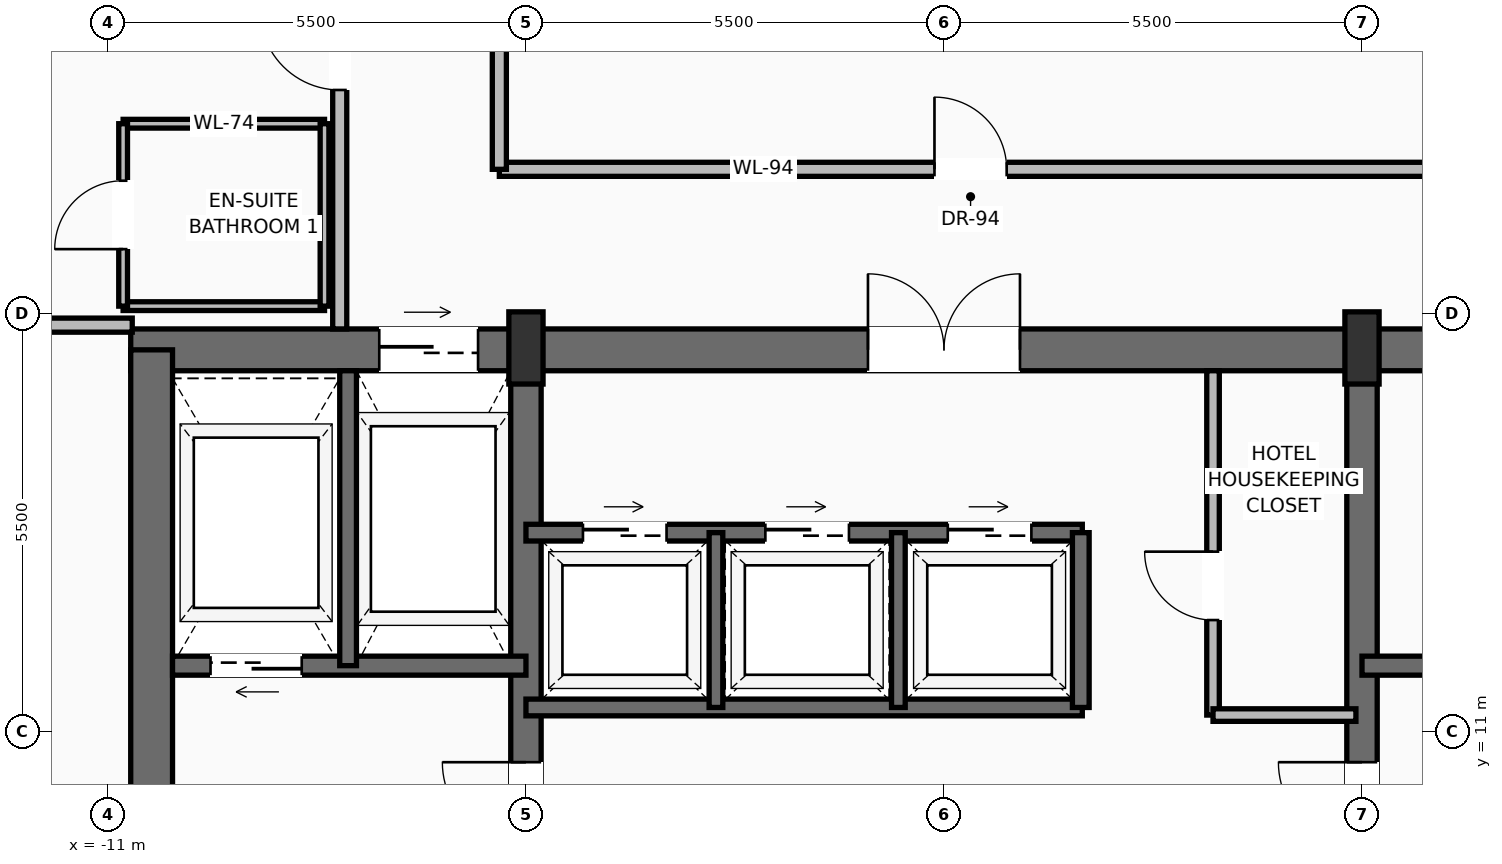
"""IFC4 building model, lengths in metres.
Left out: names, types, materials, properties, quantities, classifications, styles, units other than length and angle.
Written with IfcOpenShell. Run it as: python <this file> out.ifc"""

import sys

from ifc_helpers import new_model, si_unit, direction, frame, frame_2d, origin, origin_2d, place, context, subcontext, project, spatial, rectangle, extrude, source, transform, mapped, element, fill, save


model = new_model("IFC4")
c1 = context("Model", 3, precision=1e-05, world=origin(), true_north=direction((0.0, 1.0)))
c2 = subcontext(c1, "Body", "Model", "MODEL_VIEW")
j1 = project(units=[si_unit("LENGTHUNIT", "METRE"), si_unit("PLANEANGLEUNIT", "RADIAN")], contexts=[c1])
p1 = place(None, origin())
s1 = spatial("IfcSite", under=j1, at=p1, CompositionType="ELEMENT")
p2 = place(p1, origin())
s2 = spatial("IfcBuilding", under=s1, at=p2, CompositionType="ELEMENT")
p3 = place(p2, frame((0.0, 0.0, 240.7)))
s3 = spatial("IfcBuildingStorey", under=s2, at=p3, CompositionType="ELEMENT", Elevation=240.7)
p4 = place(p3, frame((-10.7, 16.025, 0.0), z_axis=(0.0, 0.0, 1.0), x_axis=(1.0, 0.0, 0.0)))
e1 = element("IfcWall", 1, at=p4, inside=s3, PredefinedType="SHEAR", context=c2, shape_type="SweptSolid", body=[
    extrude(rectangle(XDim=21.4, YDim=0.55, at=frame_2d((10.7, 0.0))), origin(), (0.0, 0.0, 1.0), 3.24),
])
p5 = place(p4, frame((3.27, 0.0, 0.0)))
e2 = element("IfcOpeningElement", 2, at=p5, cuts=e1, PredefinedType="OPENING", context=c2, shape_type="SweptSolid", body=[
    extrude(rectangle(XDim=1.3, YDim=2.3, at=frame_2d((0.65, 1.15))), frame((0.0, 0.285, 0.0), z_axis=(0.0, -1.0, 0.0), x_axis=(1.0, 0.0, 0.0)), (0.0, 0.0, 1.0), 0.57),
])
p6 = place(p4, frame((9.7, 0.0, 0.0)))
e3 = element("IfcOpeningElement", 3, at=p6, cuts=e1, PredefinedType="OPENING", context=c2, shape_type="SweptSolid", body=[
    extrude(rectangle(XDim=2.0, YDim=2.4, at=frame_2d((1.0, 1.2))), frame((0.0, 0.285, 0.0), z_axis=(0.0, -1.0, 0.0), x_axis=(1.0, 0.0, 0.0)), (0.0, 0.0, 1.0), 0.57),
])
p7 = place(p3, frame((-10.425, 0.575, 0.0), z_axis=(0.0, 0.0, 1.0), x_axis=(0.0, 1.0, 0.0)))
e4 = element("IfcWall", 4, at=p7, inside=s3, PredefinedType="SHEAR", context=c2, shape_type="SweptSolid", body=[
    extrude(rectangle(XDim=15.45, YDim=0.55, at=frame_2d((7.725, 0.0))), origin(), (0.0, 0.0, 1.0), 3.24),
])
p8 = place(p3, frame((-5.5, 0.575, 0.0), z_axis=(0.0, 0.0, 1.0), x_axis=(0.0, 1.0, 0.0)))
e5 = element("IfcWall", 5, at=p8, inside=s3, PredefinedType="SHEAR", context=c2, shape_type="SweptSolid", body=[
    extrude(rectangle(XDim=15.45, YDim=0.4, at=frame_2d((7.725, 0.0))), origin(), (0.0, 0.0, 1.0), 3.24),
])
p9 = place(p8, frame((8.925, 0.0, 0.0)))
e6 = element("IfcOpeningElement", 6, at=p9, cuts=e5, PredefinedType="OPENING", context=c2, shape_type="SweptSolid", body=[
    extrude(rectangle(XDim=1.1, YDim=2.2, at=frame_2d((0.55, 1.1))), frame((0.0, 0.21, 0.0), z_axis=(0.0, -1.0, 0.0), x_axis=(1.0, 0.0, 0.0)), (0.0, 0.0, 1.0), 0.42),
])
p10 = place(p3, frame((5.5, 0.575, 0.0), z_axis=(0.0, 0.0, 1.0), x_axis=(0.0, 1.0, 0.0)))
e7 = element("IfcWall", 7, at=p10, inside=s3, PredefinedType="SHEAR", context=c2, shape_type="SweptSolid", body=[
    extrude(rectangle(XDim=15.45, YDim=0.4, at=frame_2d((7.725, 0.0))), origin(), (0.0, 0.0, 1.0), 3.24),
])
p11 = place(p10, frame((8.925, 0.0, 0.0)))
e8 = element("IfcOpeningElement", 8, at=p11, cuts=e7, PredefinedType="OPENING", context=c2, shape_type="SweptSolid", body=[
    extrude(rectangle(XDim=1.1, YDim=2.2, at=frame_2d((0.55, 1.1))), frame((0.0, 0.21, 0.0), z_axis=(0.0, -1.0, 0.0), x_axis=(1.0, 0.0, 0.0)), (0.0, 0.0, 1.0), 0.42),
])
m1 = source(origin(), c2, "Body", "SweptSolid", [
    extrude(rectangle(XDim=0.45, YDim=0.95, at=origin_2d()), origin(), (0.0, 0.0, 1.0), 3.45),
])
for number, where, z_axis, x_axis in (
    (9, (-5.5, 16.05, 0.0), (0.0, 0.0, 1.0), (1.0, 0.0, 0.0)),
    (10, (5.5, 16.05, 0.0), (0.0, 0.0, 1.0), (1.0, 0.0, 0.0)),
):
    element("IfcColumn", number, at=place(p3, frame(where, z_axis=z_axis, x_axis=x_axis)), inside=s3, PredefinedType="PILASTER", context=c2, shape_type="MappedRepresentation", body=[
        mapped(m1, transform((0.0, 0.0, 0.0), scale=1.0)),
    ])
p12 = place(p3, frame((-19.35, 15.056, 0.0), z_axis=(0.0, 0.0, 1.0), x_axis=(0.507707822225, 0.861529318858, 0.0)))
e11 = element("IfcWall", 11, at=p12, inside=s3, PredefinedType="SOLIDWALL", context=c2, shape_type="SweptSolid", body=[
    extrude(rectangle(XDim=19.606, YDim=0.28, at=frame_2d((9.803, 0.0))), origin(), (0.0, 0.0, 1.0), 2.82),
])
p13 = place(p12, frame((4.705, 0.0, 0.0)))
e12 = element("IfcOpeningElement", 12, at=p13, cuts=e11, PredefinedType="OPENING", context=c2, shape_type="SweptSolid", body=[
    extrude(rectangle(XDim=1.6, YDim=2.35, at=frame_2d((0.8, 1.175))), frame((0.0, 0.15, 0.0), z_axis=(0.0, -1.0, 0.0), x_axis=(1.0, 0.0, 0.0)), (0.0, 0.0, 1.0), 0.3),
])
p14 = place(p12, frame((13.332, 0.0, 0.9)))
e13 = element("IfcOpeningElement", 13, at=p14, cuts=e11, PredefinedType="OPENING", context=c2, shape_type="SweptSolid", body=[
    extrude(rectangle(XDim=2.0, YDim=1.75, at=frame_2d((1.0, 0.875))), frame((0.0, 0.15, 0.0), z_axis=(0.0, -1.0, 0.0), x_axis=(1.0, 0.0, 0.0)), (0.0, 0.0, 1.0), 0.3),
])
p15 = place(p3, frame((-5.5, 11.87, 0.0), z_axis=(0.0, 0.0, 1.0), x_axis=(-1.0, 0.0, 0.0)))
e14 = element("IfcWall", 14, at=p15, inside=s3, PredefinedType="SOLIDWALL", context=c2, shape_type="SweptSolid", body=[
    extrude(rectangle(XDim=4.65, YDim=0.25, at=frame_2d((2.325, 0.0))), origin(), (0.0, 0.0, 1.0), 3.24),
])
p16 = place(p15, frame((2.95, 0.0, 0.0)))
e15 = element("IfcOpeningElement", 15, at=p16, cuts=e14, PredefinedType="OPENING", context=c2, shape_type="SweptSolid", body=[
    extrude(rectangle(XDim=1.2, YDim=2.25, at=frame_2d((0.6, 1.125))), frame((0.0, 0.135, 0.0), z_axis=(0.0, -1.0, 0.0), x_axis=(1.0, 0.0, 0.0)), (0.0, 0.0, 1.0), 0.27),
])
p17 = place(p3, frame((-7.84, 11.87, 0.0), z_axis=(0.0, 0.0, 1.0), x_axis=(0.0, 1.0, 0.0)))
e16 = element("IfcWall", 16, at=p17, inside=s3, PredefinedType="SOLIDWALL", context=c2, shape_type="SweptSolid", body=[
    extrude(rectangle(XDim=3.88, YDim=0.22, at=frame_2d((1.94, 0.0))), origin(), (0.0, 0.0, 1.0), 3.24),
])
p18 = place(p3, frame((10.15, 11.87, 0.0), z_axis=(0.0, 0.0, 1.0), x_axis=(-1.0, 0.0, 0.0)))
e17 = element("IfcWall", 17, at=p18, inside=s3, PredefinedType="SOLIDWALL", context=c2, shape_type="SweptSolid", body=[
    extrude(rectangle(XDim=4.65, YDim=0.25, at=frame_2d((2.325, 0.0))), origin(), (0.0, 0.0, 1.0), 3.24),
])
p19 = place(p18, frame((0.5, 0.0, 0.0)))
e18 = element("IfcOpeningElement", 18, at=p19, cuts=e17, PredefinedType="OPENING", context=c2, shape_type="SweptSolid", body=[
    extrude(rectangle(XDim=1.2, YDim=2.25, at=frame_2d((0.6, 1.125))), frame((0.0, 0.135, 0.0), z_axis=(0.0, -1.0, 0.0), x_axis=(1.0, 0.0, 0.0)), (0.0, 0.0, 1.0), 0.27),
])
p20 = place(p3, frame((-5.5, 11.32, 0.0), z_axis=(0.0, 0.0, 1.0), x_axis=(1.0, 0.0, 0.0)))
e19 = element("IfcWall", 19, at=p20, inside=s3, PredefinedType="SOLIDWALL", context=c2, shape_type="SweptSolid", body=[
    extrude(rectangle(XDim=7.32, YDim=0.22, at=frame_2d((3.66, 0.0))), origin(), (0.0, 0.0, 1.0), 3.24),
])
p21 = place(p3, frame((-5.5, 13.62, 0.0), z_axis=(0.0, 0.0, 1.0), x_axis=(1.0, 0.0, 0.0)))
e20 = element("IfcWall", 20, at=p21, inside=s3, PredefinedType="SOLIDWALL", context=c2, shape_type="SweptSolid", body=[
    extrude(rectangle(XDim=7.32, YDim=0.22, at=frame_2d((3.66, 0.0))), origin(), (0.0, 0.0, 1.0), 3.24),
])
p22 = place(p21, frame((0.75, 0.0, 0.0)))
e21 = element("IfcOpeningElement", 21, at=p22, cuts=e20, PredefinedType="OPENING", context=c2, shape_type="SweptSolid", body=[
    extrude(rectangle(XDim=1.1, YDim=2.2, at=frame_2d((0.55, 1.1))), frame((0.0, 0.12, 0.0), z_axis=(0.0, -1.0, 0.0), x_axis=(1.0, 0.0, 0.0)), (0.0, 0.0, 1.0), 0.24),
])
p23 = place(p21, frame((3.15, 0.0, 0.0)))
e22 = element("IfcOpeningElement", 22, at=p23, cuts=e20, PredefinedType="OPENING", context=c2, shape_type="SweptSolid", body=[
    extrude(rectangle(XDim=1.1, YDim=2.2, at=frame_2d((0.55, 1.1))), frame((0.0, 0.12, 0.0), z_axis=(0.0, -1.0, 0.0), x_axis=(1.0, 0.0, 0.0)), (0.0, 0.0, 1.0), 0.24),
])
p24 = place(p21, frame((5.55, 0.0, 0.0)))
e23 = element("IfcOpeningElement", 23, at=p24, cuts=e20, PredefinedType="OPENING", context=c2, shape_type="SweptSolid", body=[
    extrude(rectangle(XDim=1.1, YDim=2.2, at=frame_2d((0.55, 1.1))), frame((0.0, 0.12, 0.0), z_axis=(0.0, -1.0, 0.0), x_axis=(1.0, 0.0, 0.0)), (0.0, 0.0, 1.0), 0.24),
])
p25 = place(p3, frame((1.8, 11.32, 0.0), z_axis=(0.0, 0.0, 1.0), x_axis=(0.0, 1.0, 0.0)))
e24 = element("IfcWall", 24, at=p25, inside=s3, PredefinedType="SOLIDWALL", context=c2, shape_type="SweptSolid", body=[
    extrude(rectangle(XDim=2.3, YDim=0.22, at=frame_2d((1.15, 0.0))), origin(), (0.0, 0.0, 1.0), 3.24),
])
for number, where, z_axis, x_axis in (
    (25, (-3.0, 11.32, 0.0), (0.0, 0.0, 1.0), (0.0, 1.0, 0.0)),
    (26, (-0.6, 11.32, 0.0), (0.0, 0.0, 1.0), (0.0, 1.0, 0.0)),
):
    element("IfcWall", number, at=place(p3, frame(where, z_axis=z_axis, x_axis=x_axis)), inside=s3, PredefinedType="SOLIDWALL", context=c2, shape_type="SweptSolid", body=[
        extrude(rectangle(XDim=2.3, YDim=0.18, at=frame_2d((1.15, 0.0))), origin(), (0.0, 0.0, 1.0), 3.24),
    ])
p26 = place(p3, frame((3.54, 11.22, 0.0), z_axis=(0.0, 0.0, 1.0), x_axis=(0.0, 1.0, 0.0)))
e27 = element("IfcWall", 27, at=p26, inside=s3, PredefinedType="PARTITIONING", context=c2, shape_type="SweptSolid", body=[
    extrude(rectangle(XDim=4.53, YDim=0.165, at=frame_2d((2.265, 0.0))), origin(), (0.0, 0.0, 1.0), 3.232),
])
p27 = place(p26, frame((1.25, 0.0, 0.0)))
e28 = element("IfcOpeningElement", 28, at=p27, cuts=e27, PredefinedType="OPENING", context=c2, shape_type="SweptSolid", body=[
    extrude(rectangle(XDim=0.9, YDim=2.1, at=frame_2d((0.45, 1.05))), frame((0.0, 0.093, 0.0), z_axis=(0.0, -1.0, 0.0), x_axis=(1.0, 0.0, 0.0)), (0.0, 0.0, 1.0), 0.185),
])
p28 = place(p3, frame((3.54, 11.22, 0.0), z_axis=(0.0, 0.0, 1.0), x_axis=(1.0, 0.0, 0.0)))
e29 = element("IfcWall", 29, at=p28, inside=s3, PredefinedType="PARTITIONING", context=c2, shape_type="SweptSolid", body=[
    extrude(rectangle(XDim=1.88, YDim=0.165, at=frame_2d((0.94, 0.0))), origin(), (0.0, 0.0, 1.0), 3.232),
])
p29 = place(p3, frame((-5.85, 18.4, 0.0), z_axis=(0.0, 0.0, 1.0), x_axis=(1.0, 0.0, 0.0)))
e30 = element("IfcWall", 30, at=p29, inside=s3, PredefinedType="PARTITIONING", context=c2, shape_type="SweptSolid", body=[
    extrude(rectangle(XDim=12.4, YDim=0.185, at=frame_2d((6.2, 0.0))), origin(), (0.0, 0.0, 1.0), 3.232),
])
p30 = place(p29, frame((5.725, 0.0, 0.0)))
e31 = element("IfcOpeningElement", 31, at=p30, cuts=e30, PredefinedType="OPENING", context=c2, shape_type="SweptSolid", body=[
    extrude(rectangle(XDim=0.95, YDim=2.2, at=frame_2d((0.475, 1.1))), frame((0.0, 0.103, 0.0), z_axis=(0.0, -1.0, 0.0), x_axis=(1.0, 0.0, 0.0)), (0.0, 0.0, 1.0), 0.205),
])
p31 = place(p3, frame((-5.85, 18.4, 0.0), z_axis=(0.0, 0.0, 1.0), x_axis=(0.0, 1.0, 0.0)))
e32 = element("IfcWall", 32, at=p31, inside=s3, PredefinedType="PARTITIONING", context=c2, shape_type="SweptSolid", body=[
    extrude(rectangle(XDim=9.7, YDim=0.185, at=frame_2d((4.85, 0.0))), origin(), (0.0, 0.0, 1.0), 3.232),
])
p32 = place(p3, frame((-7.95, 16.3, 0.0), z_axis=(0.0, 0.0, 1.0), x_axis=(0.0, 1.0, 0.0)))
e33 = element("IfcWall", 33, at=p32, inside=s3, PredefinedType="PARTITIONING", context=c2, shape_type="SweptSolid", body=[
    extrude(rectangle(XDim=13.9, YDim=0.185, at=frame_2d((6.95, 0.0))), origin(), (0.0, 0.0, 1.0), 3.232),
])
p33 = place(p32, frame((3.144, 0.0, 0.0)))
e34 = element("IfcOpeningElement", 34, at=p33, cuts=e33, PredefinedType="OPENING", context=c2, shape_type="SweptSolid", body=[
    extrude(rectangle(XDim=1.05, YDim=2.25, at=frame_2d((0.525, 1.125))), frame((0.0, 0.103, 0.0), z_axis=(0.0, -1.0, 0.0), x_axis=(1.0, 0.0, 0.0)), (0.0, 0.0, 1.0), 0.205),
])
p34 = place(p32, frame((9.849, 0.0, 0.0)))
e35 = element("IfcOpeningElement", 35, at=p34, cuts=e33, PredefinedType="OPENING", context=c2, shape_type="SweptSolid", body=[
    extrude(rectangle(XDim=1.05, YDim=2.25, at=frame_2d((0.525, 1.125))), frame((0.0, 0.103, 0.0), z_axis=(0.0, -1.0, 0.0), x_axis=(1.0, 0.0, 0.0)), (0.0, 0.0, 1.0), 0.205),
])
p35 = place(p3, frame((-18.738, 16.35, 0.0), z_axis=(0.0, 0.0, 1.0), x_axis=(1.0, 0.0, 0.0)))
e36 = element("IfcWall", 36, at=p35, inside=s3, PredefinedType="PARTITIONING", context=c2, shape_type="SweptSolid", body=[
    extrude(rectangle(XDim=8.058, YDim=0.185, at=frame_2d((4.029, 0.0))), origin(), (0.0, 0.0, 1.0), 3.232),
])
p36 = place(p35, frame((4.611, 0.0, 0.0)))
e37 = element("IfcOpeningElement", 37, at=p36, cuts=e36, PredefinedType="OPENING", context=c2, shape_type="SweptSolid", body=[
    extrude(rectangle(XDim=1.05, YDim=2.25, at=frame_2d((0.525, 1.125))), frame((0.0, 0.103, 0.0), z_axis=(0.0, -1.0, 0.0), x_axis=(1.0, 0.0, 0.0)), (0.0, 0.0, 1.0), 0.205),
])
for number, where, z_axis, x_axis in (
    (38, (-10.8, 16.6, 0.0), (0.0, 0.0, 1.0), (1.0, 0.0, 0.0)),
    (39, (-10.8, 19.0, 0.0), (0.0, 0.0, 1.0), (1.0, 0.0, 0.0)),
):
    element("IfcWall", number, at=place(p3, frame(where, z_axis=z_axis, x_axis=x_axis)), inside=s3, PredefinedType="PARTITIONING", context=c2, shape_type="SweptSolid", body=[
        extrude(rectangle(XDim=2.65, YDim=0.115, at=frame_2d((1.325, 0.0))), origin(), (0.0, 0.0, 1.0), 3.232),
    ])
p37 = place(p3, frame((-10.8, 16.6, 0.0), z_axis=(0.0, 0.0, 1.0), x_axis=(0.0, 1.0, 0.0)))
e40 = element("IfcWall", 40, at=p37, inside=s3, PredefinedType="PARTITIONING", context=c2, shape_type="SweptSolid", body=[
    extrude(rectangle(XDim=2.4, YDim=0.115, at=frame_2d((1.2, 0.0))), origin(), (0.0, 0.0, 1.0), 3.232),
])
p38 = place(p37, frame((0.75, 0.0, 0.0)))
e41 = element("IfcOpeningElement", 41, at=p38, cuts=e40, PredefinedType="OPENING", context=c2, shape_type="SweptSolid", body=[
    extrude(rectangle(XDim=0.9, YDim=2.15, at=frame_2d((0.45, 1.075))), frame((0.0, 0.067, 0.0), z_axis=(0.0, -1.0, 0.0), x_axis=(1.0, 0.0, 0.0)), (0.0, 0.0, 1.0), 0.135),
])
p39 = place(p3, frame((-8.15, 16.6, 0.0), z_axis=(0.0, 0.0, 1.0), x_axis=(0.0, 1.0, 0.0)))
e42 = element("IfcWall", 42, at=p39, inside=s3, PredefinedType="PARTITIONING", context=c2, shape_type="SweptSolid", body=[
    extrude(rectangle(XDim=2.4, YDim=0.115, at=frame_2d((1.2, 0.0))), origin(), (0.0, 0.0, 1.0), 3.232),
])
m2 = source(origin(), c2, "Body", "SweptSolid", [
    extrude(rectangle(XDim=1.1, YDim=2.2, at=frame_2d((0.55, 1.1))), frame((0.0, 0.025, 0.0), z_axis=(0.0, -1.0, 0.0), x_axis=(1.0, 0.0, 0.0)), (0.0, 0.0, 1.0), 0.05),
])
p40 = place(p9, origin())
e43 = element("IfcDoor", 43, at=p40, inside=s3, OperationType="SINGLE_SWING_RIGHT", PredefinedType="DOOR", context=c2, shape_type="MappedRepresentation", body=[
    mapped(m2, transform((0.0, 0.0, 0.0), scale=1.0)),
])
fill(e6, e43)
m3 = source(origin(), c2, "Body", "SweptSolid", [
    extrude(rectangle(XDim=1.2, YDim=2.25, at=frame_2d((0.6, 1.125))), frame((0.0, 0.025, 0.0), z_axis=(0.0, -1.0, 0.0), x_axis=(1.0, 0.0, 0.0)), (0.0, 0.0, 1.0), 0.05),
])
p41 = place(p16, origin())
e44 = element("IfcDoor", 44, at=p41, inside=s3, OperationType="SLIDING_TO_LEFT", PredefinedType="DOOR", context=c2, shape_type="MappedRepresentation", body=[
    mapped(m3, transform((0.0, 0.0, 0.0), scale=1.0)),
])
fill(e15, e44)
m4 = source(origin(), c2, "Body", "SweptSolid", [
    extrude(rectangle(XDim=1.3, YDim=2.3, at=frame_2d((0.65, 1.15))), frame((0.0, 0.025, 0.0), z_axis=(0.0, -1.0, 0.0), x_axis=(1.0, 0.0, 0.0)), (0.0, 0.0, 1.0), 0.05),
])
p42 = place(p5, origin())
e45 = element("IfcDoor", 45, at=p42, inside=s3, OperationType="SLIDING_TO_RIGHT", PredefinedType="DOOR", context=c2, shape_type="MappedRepresentation", body=[
    mapped(m4, transform((0.0, 0.0, 0.0), scale=1.0)),
])
fill(e2, e45)
p43 = place(p11, origin())
e46 = element("IfcDoor", 46, at=p43, inside=s3, OperationType="SINGLE_SWING_RIGHT", PredefinedType="DOOR", context=c2, shape_type="MappedRepresentation", body=[
    mapped(m2, transform((0.0, 0.0, 0.0), scale=1.0)),
])
fill(e8, e46)
m5 = source(origin(), c2, "Body", "SweptSolid", [
    extrude(rectangle(XDim=2.0, YDim=2.4, at=frame_2d((1.0, 1.2))), frame((0.0, 0.025, 0.0), z_axis=(0.0, -1.0, 0.0), x_axis=(1.0, 0.0, 0.0)), (0.0, 0.0, 1.0), 0.05),
])
p44 = place(p6, origin())
e47 = element("IfcDoor", 47, at=p44, inside=s3, OperationType="DOUBLE_DOOR_SINGLE_SWING", PredefinedType="DOOR", context=c2, shape_type="MappedRepresentation", body=[
    mapped(m5, transform((0.0, 0.0, 0.0), scale=1.0)),
])
fill(e3, e47)
m6 = source(origin(), c2, "Body", "SweptSolid", [
    extrude(rectangle(XDim=1.1, YDim=2.2, at=frame_2d((0.55, 1.1))), frame((0.0, 0.025, 0.0), z_axis=(0.0, -1.0, 0.0), x_axis=(1.0, 0.0, 0.0)), (0.0, 0.0, 1.0), 0.05),
])
p45 = place(p22, origin())
e48 = element("IfcDoor", 48, at=p45, inside=s3, OperationType="SLIDING_TO_RIGHT", PredefinedType="DOOR", context=c2, shape_type="MappedRepresentation", body=[
    mapped(m6, transform((0.0, 0.0, 0.0), scale=1.0)),
])
fill(e21, e48)
p46 = place(p23, origin())
e49 = element("IfcDoor", 49, at=p46, inside=s3, OperationType="SLIDING_TO_RIGHT", PredefinedType="DOOR", context=c2, shape_type="MappedRepresentation", body=[
    mapped(m6, transform((0.0, 0.0, 0.0), scale=1.0)),
])
fill(e22, e49)
p47 = place(p24, origin())
e50 = element("IfcDoor", 50, at=p47, inside=s3, OperationType="SLIDING_TO_RIGHT", PredefinedType="DOOR", context=c2, shape_type="MappedRepresentation", body=[
    mapped(m6, transform((0.0, 0.0, 0.0), scale=1.0)),
])
fill(e23, e50)
m7 = source(origin(), c2, "Body", "SweptSolid", [
    extrude(rectangle(XDim=0.9, YDim=2.1, at=frame_2d((0.45, 1.05))), frame((0.0, 0.025, 0.0), z_axis=(0.0, -1.0, 0.0), x_axis=(1.0, 0.0, 0.0)), (0.0, 0.0, 1.0), 0.05),
])
p48 = place(p27, origin())
e51 = element("IfcDoor", 51, at=p48, inside=s3, OperationType="SINGLE_SWING_RIGHT", PredefinedType="DOOR", context=c2, shape_type="MappedRepresentation", body=[
    mapped(m7, transform((0.0, 0.0, 0.0), scale=1.0)),
])
fill(e28, e51)
m8 = source(origin(), c2, "Body", "SweptSolid", [
    extrude(rectangle(XDim=0.95, YDim=2.2, at=frame_2d((0.475, 1.1))), frame((0.0, 0.025, 0.0), z_axis=(0.0, -1.0, 0.0), x_axis=(1.0, 0.0, 0.0)), (0.0, 0.0, 1.0), 0.05),
])
p49 = place(p30, origin())
e52 = element("IfcDoor", 52, at=p49, inside=s3, OperationType="SINGLE_SWING_LEFT", PredefinedType="DOOR", context=c2, shape_type="MappedRepresentation", body=[
    mapped(m8, transform((0.0, 0.0, 0.0), scale=1.0)),
])
fill(e31, e52)
m9 = source(origin(), c2, "Body", "SweptSolid", [
    extrude(rectangle(XDim=1.05, YDim=2.25, at=frame_2d((0.525, 1.125))), frame((0.0, 0.025, 0.0), z_axis=(0.0, -1.0, 0.0), x_axis=(1.0, 0.0, 0.0)), (0.0, 0.0, 1.0), 0.05),
])
p50 = place(p33, origin())
e53 = element("IfcDoor", 53, at=p50, inside=s3, OperationType="SINGLE_SWING_RIGHT", PredefinedType="DOOR", context=c2, shape_type="MappedRepresentation", body=[
    mapped(m9, transform((0.0, 0.0, 0.0), scale=1.0)),
])
fill(e34, e53)
m10 = source(origin(), c2, "Body", "SweptSolid", [
    extrude(rectangle(XDim=0.9, YDim=2.15, at=frame_2d((0.45, 1.075))), frame((0.0, 0.025, 0.0), z_axis=(0.0, -1.0, 0.0), x_axis=(1.0, 0.0, 0.0)), (0.0, 0.0, 1.0), 0.05),
])
p51 = place(p38, origin())
e54 = element("IfcDoor", 54, at=p51, inside=s3, OperationType="SINGLE_SWING_LEFT", PredefinedType="DOOR", context=c2, shape_type="MappedRepresentation", body=[
    mapped(m10, transform((0.0, 0.0, 0.0), scale=1.0)),
])
fill(e41, e54)
save(model, sys.argv[1])
